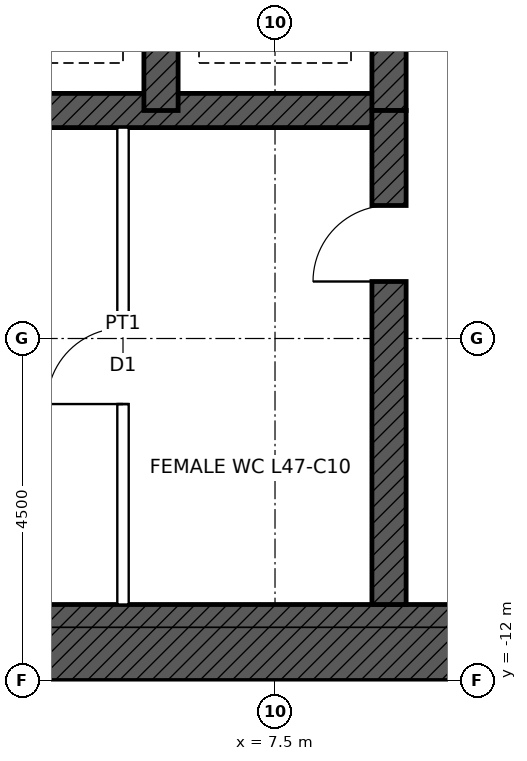
"""IFC4 building model, lengths in metres.
Left out: names, types, materials, properties, quantities, classifications, styles, units other than length and angle.
Written with IfcOpenShell. Run it as: python <this file> out.ifc"""

import sys

from ifc_helpers import new_model, si_unit, direction, frame, frame_2d, origin, place, context, subcontext, project, spatial, rectangle, extrude, element, fill, save


model = new_model("IFC4")
c1 = context("Model", 3, precision=1e-05, world=origin(), true_north=direction((0.0, 1.0)))
c2 = subcontext(c1, "Body", "Model", "MODEL_VIEW")
j1 = project(units=[si_unit("LENGTHUNIT", "METRE"), si_unit("PLANEANGLEUNIT", "RADIAN")], contexts=[c1])
p1 = place(None, origin())
s1 = spatial("IfcSite", under=j1, at=p1, CompositionType="ELEMENT")
p2 = place(p1, origin())
s2 = spatial("IfcBuilding", under=s1, at=p2, CompositionType="ELEMENT")
p3 = place(p2, frame((0.0, 0.0, 221.9)))
s3 = spatial("IfcBuildingStorey", under=s2, at=p3, CompositionType="ELEMENT", Elevation=221.9)
p4 = place(p3, frame((12.0, -11.5, 0.0), z_axis=(0.0, 0.0, 1.0), x_axis=(-1.0, 0.0, 0.0)))
e1 = element("IfcWall", 1, at=p4, inside=s3, PredefinedType="SHEAR", context=c2, shape_type="SweptSolid", body=[
    extrude(rectangle(XDim=24.0, YDim=1.0, at=frame_2d((12.0, 0.0))), origin(), (0.0, 0.0, 1.0), 4.0),
])
p5 = place(p4, frame((11.5, 0.0, 0.0)))
e2 = element("IfcOpeningElement", 2, at=p5, cuts=e1, PredefinedType="OPENING", context=c2, shape_type="SweptSolid", body=[
    extrude(rectangle(XDim=1.0, YDim=2.1, at=frame_2d((0.5, 1.05))), frame((0.0, 0.51, 0.0), z_axis=(0.0, -1.0, 0.0), x_axis=(1.0, 0.0, 0.0)), (0.0, 0.0, 1.0), 1.02),
])
p6 = place(p4, frame((1.0, 0.0, 0.0)))
e3 = element("IfcOpeningElement", 3, at=p6, cuts=e1, PredefinedType="OPENING", context=c2, shape_type="SweptSolid", body=[
    extrude(rectangle(XDim=1.0, YDim=2.4, at=frame_2d((0.5, 1.2))), frame((0.0, 0.51, 0.0), z_axis=(0.0, -1.0, 0.0), x_axis=(1.0, 0.0, 0.0)), (0.0, 0.0, 1.0), 1.02),
])
p7 = place(p3, frame((-9.0, -4.5, 0.0), z_axis=(0.0, 0.0, 1.0), x_axis=(1.0, 0.0, 0.0)))
e4 = element("IfcWall", 4, at=p7, inside=s3, PredefinedType="SHEAR", context=c2, shape_type="SweptSolid", body=[
    extrude(rectangle(XDim=18.0, YDim=0.45, at=frame_2d((9.0, 0.0))), origin(), (0.0, 0.0, 1.0), 4.0),
])
for number, where, z_axis, x_axis in (
    (5, (9.0, -4.5, 0.0), (0.0, 0.0, 1.0), (0.0, 1.0, 0.0)),
    (6, (6.0, -4.5, 0.0), (0.0, 0.0, 1.0), (0.0, 1.0, 0.0)),
):
    element("IfcWall", number, at=place(p3, frame(where, z_axis=z_axis, x_axis=x_axis)), inside=s3, PredefinedType="SHEAR", context=c2, shape_type="SweptSolid", body=[
        extrude(rectangle(XDim=3.0, YDim=0.45, at=frame_2d((1.5, 0.0))), origin(), (0.0, 0.0, 1.0), 4.0),
    ])
p8 = place(p3, frame((9.0, -11.0, 0.0), z_axis=(0.0, 0.0, 1.0), x_axis=(0.0, 1.0, 0.0)))
e7 = element("IfcWall", 7, at=p8, inside=s3, PredefinedType="SHEAR", context=c2, shape_type="SweptSolid", body=[
    extrude(rectangle(XDim=6.5, YDim=0.45, at=frame_2d((3.25, 0.0))), origin(), (0.0, 0.0, 1.0), 4.0),
])
p9 = place(p8, frame((4.25, 0.0, 0.0)))
e8 = element("IfcOpeningElement", 8, at=p9, cuts=e7, PredefinedType="OPENING", context=c2, shape_type="SweptSolid", body=[
    extrude(rectangle(XDim=1.0, YDim=2.1, at=frame_2d((0.5, 1.05))), frame((0.0, 0.235, 0.0), z_axis=(0.0, -1.0, 0.0), x_axis=(1.0, 0.0, 0.0)), (0.0, 0.0, 1.0), 0.47),
])
p10 = place(p3, frame((5.5, -11.0, 0.0), z_axis=(0.0, 0.0, 1.0), x_axis=(0.0, 1.0, 0.0)))
e9 = element("IfcWall", 9, at=p10, inside=s3, PredefinedType="PARTITIONING", context=c2, shape_type="SweptSolid", body=[
    extrude(rectangle(XDim=6.275, YDim=0.15, at=frame_2d((3.137, 0.0))), origin(), (0.0, 0.0, 1.0), 3.75),
])
p11 = place(p10, frame((2.637, 0.0, 0.0)))
e10 = element("IfcOpeningElement", 10, at=p11, cuts=e9, PredefinedType="OPENING", context=c2, shape_type="SweptSolid", body=[
    extrude(rectangle(XDim=1.0, YDim=2.1, at=frame_2d((0.5, 1.05))), frame((0.0, 0.085, 0.0), z_axis=(0.0, -1.0, 0.0), x_axis=(1.0, 0.0, 0.0)), (0.0, 0.0, 1.0), 0.17),
])
p12 = place(p9, origin())
e11 = element("IfcDoor", 11, at=p12, inside=s3, OperationType="SINGLE_SWING_LEFT", PredefinedType="DOOR", context=c2, shape_type="SweptSolid", body=[
    extrude(rectangle(XDim=1.0, YDim=2.1, at=frame_2d((0.5, 1.05))), frame((0.0, 0.025, 0.0), z_axis=(0.0, -1.0, 0.0), x_axis=(1.0, 0.0, 0.0)), (0.0, 0.0, 1.0), 0.05),
])
fill(e8, e11)
p13 = place(p11, origin())
e12 = element("IfcDoor", 12, at=p13, inside=s3, OperationType="SINGLE_SWING_LEFT", PredefinedType="DOOR", context=c2, shape_type="SweptSolid", body=[
    extrude(rectangle(XDim=1.0, YDim=2.1, at=frame_2d((0.5, 1.05))), frame((0.0, 0.025, 0.0), z_axis=(0.0, -1.0, 0.0), x_axis=(1.0, 0.0, 0.0)), (0.0, 0.0, 1.0), 0.05),
])
fill(e10, e12)
save(model, sys.argv[1])
